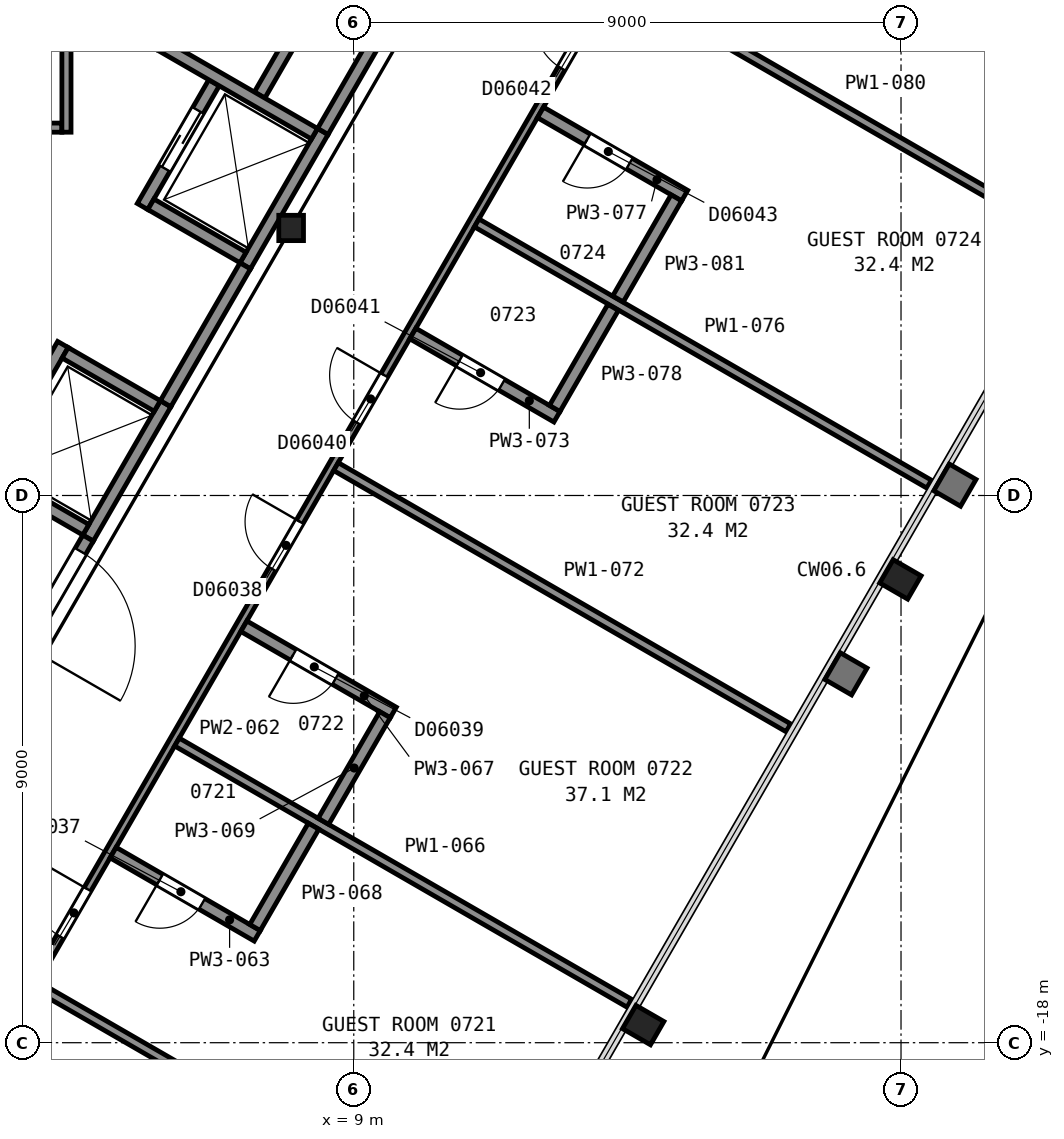
"""IFC4 building model, lengths in metres.
Left out: names, types, materials, properties, quantities, classifications, styles, units other than length and angle.
Written with IfcOpenShell. Run it as: python <this file> out.ifc"""

import sys

from ifc_helpers import new_model, si_unit, direction, frame, frame_2d, origin, origin_2d, place, context, subcontext, project, spatial, rectangle, i_section, extrude, element, fill, save


model = new_model("IFC4")
c1 = context("Model", 3, precision=1e-05, world=origin(), true_north=direction((0.0, 1.0)))
c2 = subcontext(c1, "Body", "Model", "MODEL_VIEW")
j1 = project(units=[si_unit("LENGTHUNIT", "METRE"), si_unit("PLANEANGLEUNIT", "RADIAN")], contexts=[c1])
p1 = place(None, origin())
s1 = spatial("IfcSite", under=j1, at=p1, CompositionType="ELEMENT")
p2 = place(p1, origin())
s2 = spatial("IfcBuilding", under=s1, at=p2, CompositionType="ELEMENT")
p3 = place(p2, frame((0.0, 0.0, 40.4)))
s3 = spatial("IfcBuildingStorey", under=s2, at=p3, CompositionType="ELEMENT", Elevation=40.4)
for number, where, z_axis, x_axis in (
    (1, (13.76, -17.71, 0.0), (0.0, 0.0, 1.0), (-0.5, -0.866, 0.0)),
    (2, (17.99, -10.38, 0.0), (0.0, 0.0, 1.0), (-0.5, -0.866, 0.0)),
):
    element("IfcColumn", number, at=place(p3, frame(where, z_axis=z_axis, x_axis=x_axis)), inside=s3, PredefinedType="COLUMN", context=c2, shape_type="SweptSolid", body=[
        extrude(i_section(OverallWidth=0.442, OverallDepth=0.531, WebThickness=0.066, FlangeThickness=0.106, FilletRadius=0.015, at=origin_2d()), origin(), (0.0, 0.0, 1.0), 3.575),
    ])
p4 = place(p3, frame((7.97, -4.6, 0.0), z_axis=(0.0, 0.0, 1.0), x_axis=(1.0, 0.0, 0.0)))
e3 = element("IfcColumn", 3, at=p4, inside=s3, PredefinedType="COLUMN", context=c2, shape_type="SweptSolid", body=[
    extrude(i_section(OverallWidth=0.406, OverallDepth=0.417, WebThickness=0.03, FlangeThickness=0.048, FilletRadius=0.015, at=origin_2d()), origin(), (0.0, 0.0, 1.0), 3.6),
])
p5 = place(p3, frame((4.63, -9.7, 0.0), z_axis=(0.0, 0.0, 1.0), x_axis=(0.500062241894, 0.865989465428, 0.0)))
e4 = element("IfcWall", 4, at=p5, inside=s3, PredefinedType="PARTITIONING", context=c2, shape_type="SweptSolid", body=[
    extrude(rectangle(XDim=2.55, YDim=0.2, at=frame_2d((1.275, 0.0))), origin(), (0.0, 0.0, 1.0), 3.6),
])
p6 = place(p3, frame((7.216, -5.222, 0.0), z_axis=(0.0, 0.0, 1.0), x_axis=(0.499990435942, 0.866030925526, 0.0)))
e5 = element("IfcWall", 5, at=p6, inside=s3, PredefinedType="PARTITIONING", context=c2, shape_type="SweptSolid", body=[
    extrude(rectangle(XDim=2.55, YDim=0.2, at=frame_2d((1.275, 0.0))), origin(), (0.0, 0.0, 1.0), 3.6),
])
p7 = place(p3, frame((7.451, -2.414, 0.0), z_axis=(0.0, 0.0, 1.0), x_axis=(0.500016218704, 0.866016039709, 0.0)))
e6 = element("IfcWall", 6, at=p7, inside=s3, PredefinedType="PARTITIONING", context=c2, shape_type="SweptSolid", body=[
    extrude(rectangle(XDim=4.7, YDim=0.2, at=frame_2d((2.35, 0.0))), origin(), (0.0, 0.0, 1.0), 3.6),
])
p8 = place(p3, frame((2.942, -8.725, 0.0), z_axis=(0.0, 0.0, 1.0), x_axis=(0.500020783669, 0.866013403995, 0.0)))
e7 = element("IfcWall", 7, at=p8, inside=s3, PredefinedType="PARTITIONING", context=c2, shape_type="SweptSolid", body=[
    extrude(rectangle(XDim=2.55, YDim=0.2, at=frame_2d((1.275, 0.0))), origin(), (0.0, 0.0, 1.0), 3.6),
])
p9 = place(p8, frame((0.725, 0.0, 0.0)))
e8 = element("IfcOpeningElement", 8, at=p9, cuts=e7, PredefinedType="OPENING", context=c2, shape_type="SweptSolid", body=[
    extrude(rectangle(XDim=1.1, YDim=2.1, at=frame_2d((0.55, 1.05))), frame((0.0, 0.11, 0.0), z_axis=(0.0, -1.0, 0.0), x_axis=(1.0, 0.0, 0.0)), (0.0, 0.0, 1.0), 0.22),
])
p10 = place(p3, frame((5.527, -4.247, 0.0), z_axis=(0.0, 0.0, 1.0), x_axis=(0.499938297808, 0.866061024631, 0.0)))
e9 = element("IfcWall", 9, at=p10, inside=s3, PredefinedType="PARTITIONING", context=c2, shape_type="SweptSolid", body=[
    extrude(rectangle(XDim=2.35, YDim=0.2, at=frame_2d((1.175, 0.0))), origin(), (0.0, 0.0, 1.0), 3.6),
])
p11 = place(p10, frame((0.725, 0.0, 0.0)))
e10 = element("IfcOpeningElement", 10, at=p11, cuts=e9, PredefinedType="OPENING", context=c2, shape_type="SweptSolid", body=[
    extrude(rectangle(XDim=1.1, YDim=2.1, at=frame_2d((0.55, 1.05))), frame((0.0, 0.11, 0.0), z_axis=(0.0, -1.0, 0.0), x_axis=(1.0, 0.0, 0.0)), (0.0, 0.0, 1.0), 0.22),
])
p12 = place(p3, frame((8.354, -3.051, 0.0), z_axis=(0.0, 0.0, 1.0), x_axis=(-0.866060182126, 0.499939757307, 0.0)))
e11 = element("IfcWall", 11, at=p12, inside=s3, PredefinedType="PARTITIONING", context=c2, shape_type="SweptSolid", body=[
    extrude(rectangle(XDim=2.95, YDim=0.2, at=frame_2d((1.475, 0.0))), origin(), (0.0, 0.0, 1.0), 3.6),
])
p13 = place(p3, frame((7.179, -5.086, 0.0), z_axis=(0.0, 0.0, 1.0), x_axis=(-0.866036909293, 0.499980071345, 0.0)))
e12 = element("IfcWall", 12, at=p13, inside=s3, PredefinedType="PARTITIONING", context=c2, shape_type="SweptSolid", body=[
    extrude(rectangle(XDim=1.75, YDim=0.2, at=frame_2d((0.875, 0.0))), origin(), (0.0, 0.0, 1.0), 3.6),
])
p14 = place(p3, frame((5.769, -7.528, 0.0), z_axis=(0.0, 0.0, 1.0), x_axis=(-0.866002029911, 0.500040482552, 0.0)))
e13 = element("IfcWall", 13, at=p14, inside=s3, PredefinedType="PARTITIONING", context=c2, shape_type="SweptSolid", body=[
    extrude(rectangle(XDim=1.75, YDim=0.2, at=frame_2d((0.875, 0.0))), origin(), (0.0, 0.0, 1.0), 3.6),
])
p15 = place(p3, frame((4.594, -9.563, 0.0), z_axis=(0.0, 0.0, 1.0), x_axis=(-0.866036909293, 0.499980071345, 0.0)))
e14 = element("IfcWall", 14, at=p15, inside=s3, PredefinedType="PARTITIONING", context=c2, shape_type="SweptSolid", body=[
    extrude(rectangle(XDim=1.75, YDim=0.2, at=frame_2d((0.875, 0.0))), origin(), (0.0, 0.0, 1.0), 3.6),
])
p16 = place(p3, frame((1.677, -14.815, 0.0), z_axis=(0.0, 0.0, 1.0), x_axis=(0.49999445743, 0.866028603765, 0.0)))
e15 = element("IfcWall", 15, at=p16, inside=s3, PredefinedType="PARTITIONING", context=c2, shape_type="SweptSolid", body=[
    extrude(rectangle(XDim=5.905, YDim=0.2, at=frame_2d((2.952, 0.0))), origin(), (0.0, 0.0, 1.0), 3.35),
])
p17 = place(p16, frame((3.855, 0.0, 0.0)))
e16 = element("IfcOpeningElement", 16, at=p17, cuts=e15, PredefinedType="OPENING", context=c2, shape_type="SweptSolid", body=[
    extrude(rectangle(XDim=1.8, YDim=2.1, at=frame_2d((0.9, 1.05))), frame((0.0, 0.11, 0.0), z_axis=(0.0, -1.0, 0.0), x_axis=(1.0, 0.0, 0.0)), (0.0, 0.0, 1.0), 0.22),
])
p18 = place(p3, frame((1.8, -2.95, 0.0), z_axis=(0.0, 0.0, 1.0), x_axis=(1.0, 0.0, 0.0)))
e17 = element("IfcWall", 17, at=p18, inside=s3, PredefinedType="PARTITIONING", context=c2, shape_type="SweptSolid", body=[
    extrude(rectangle(XDim=2.4, YDim=0.15, at=frame_2d((1.2, 0.0))), origin(), (0.0, 0.0, 1.0), 3.35),
])
p19 = place(p3, frame((4.275, -3.025, 0.0), z_axis=(0.0, 0.0, 1.0), x_axis=(0.0, 1.0, 0.0)))
e18 = element("IfcWall", 18, at=p19, inside=s3, PredefinedType="PARTITIONING", context=c2, shape_type="SweptSolid", body=[
    extrude(rectangle(XDim=2.923, YDim=0.15, at=frame_2d((1.461, 0.0))), origin(), (0.0, 0.0, 1.0), 3.35),
])
p20 = place(p3, frame((5.906, -7.49, 0.0), z_axis=(0.0, 0.0, 1.0), x_axis=(0.500252727967, 0.865879442048, 0.0)))
e19 = element("IfcWall", 19, at=p20, inside=s3, PredefinedType="PARTITIONING", context=c2, shape_type="SweptSolid", body=[
    extrude(rectangle(XDim=2.617, YDim=0.2, at=frame_2d((1.309, 0.0))), origin(), (0.0, 0.0, 1.0), 3.35),
])
p21 = place(p3, frame((8.492, -3.012, 0.0), z_axis=(0.0, 0.0, 1.0), x_axis=(0.499972957231, 0.866041016371, 0.0)))
e20 = element("IfcWall", 20, at=p21, inside=s3, PredefinedType="PARTITIONING", context=c2, shape_type="SweptSolid", body=[
    extrude(rectangle(XDim=10.349, YDim=0.2, at=frame_2d((5.174, 0.0))), origin(), (0.0, 0.0, 1.0), 3.35),
])
p22 = place(p3, frame((3.897, -17.132, 0.0), z_axis=(0.0, 0.0, 1.0), x_axis=(0.866084603656, -0.499897448793, 0.0)))
e21 = element("IfcWall", 21, at=p22, inside=s3, PredefinedType="PARTITIONING", context=c2, shape_type="SweptSolid", body=[
    extrude(rectangle(XDim=8.454, YDim=0.15, at=frame_2d((4.227, 0.0))), origin(), (0.0, 0.0, 1.0), 2.613),
])
p23 = place(p3, frame((16.967, 5.906, 0.0), z_axis=(0.0, 0.0, 1.0), x_axis=(-0.500024758804, -0.866011108811, 0.0)))
e22 = element("IfcWall", 22, at=p23, inside=s3, PredefinedType="PARTITIONING", context=c2, shape_type="SweptSolid", body=[
    extrude(rectangle(XDim=26.402, YDim=0.125, at=frame_2d((13.201, 0.0))), origin(), (0.0, 0.0, 1.0), 2.613),
])
p24 = place(p23, frame((24.689, 0.0, 0.0)))
e23 = element("IfcOpeningElement", 23, at=p24, cuts=e22, PredefinedType="OPENING", context=c2, shape_type="SweptSolid", body=[
    extrude(rectangle(XDim=0.9, YDim=2.1, at=frame_2d((0.45, 1.05))), frame((0.0, 0.073, 0.0), z_axis=(0.0, -1.0, 0.0), x_axis=(1.0, 0.0, 0.0)), (0.0, 0.0, 1.0), 0.145),
])
p25 = place(p23, frame((17.709, 0.0, 0.0)))
e24 = element("IfcOpeningElement", 24, at=p25, cuts=e22, PredefinedType="OPENING", context=c2, shape_type="SweptSolid", body=[
    extrude(rectangle(XDim=0.9, YDim=2.1, at=frame_2d((0.45, 1.05))), frame((0.0, 0.073, 0.0), z_axis=(0.0, -1.0, 0.0), x_axis=(1.0, 0.0, 0.0)), (0.0, 0.0, 1.0), 0.145),
])
p26 = place(p23, frame((14.928, 0.0, 0.0)))
e25 = element("IfcOpeningElement", 25, at=p26, cuts=e22, PredefinedType="OPENING", context=c2, shape_type="SweptSolid", body=[
    extrude(rectangle(XDim=0.9, YDim=2.1, at=frame_2d((0.45, 1.05))), frame((0.0, 0.073, 0.0), z_axis=(0.0, -1.0, 0.0), x_axis=(1.0, 0.0, 0.0)), (0.0, 0.0, 1.0), 0.145),
])
p27 = place(p23, frame((8.2, 0.0, 0.0)))
e26 = element("IfcOpeningElement", 26, at=p27, cuts=e22, PredefinedType="OPENING", context=c2, shape_type="SweptSolid", body=[
    extrude(rectangle(XDim=0.9, YDim=2.1, at=frame_2d((0.45, 1.05))), frame((0.0, 0.073, 0.0), z_axis=(0.0, -1.0, 0.0), x_axis=(1.0, 0.0, 0.0)), (0.0, 0.0, 1.0), 0.145),
])
p28 = place(p23, frame((5.473, 0.0, 0.0)))
e27 = element("IfcOpeningElement", 27, at=p28, cuts=e22, PredefinedType="OPENING", context=c2, shape_type="SweptSolid", body=[
    extrude(rectangle(XDim=1.0, YDim=2.1, at=frame_2d((0.5, 1.05))), frame((0.0, 0.073, 0.0), z_axis=(0.0, -1.0, 0.0), x_axis=(1.0, 0.0, 0.0)), (0.0, 0.0, 1.0), 0.145),
])
p29 = place(p3, frame((5.042, -14.873, 0.0), z_axis=(0.0, 0.0, 1.0), x_axis=(0.866005850709, -0.50003386539, 0.0)))
e28 = element("IfcWall", 28, at=p29, inside=s3, PredefinedType="PARTITIONING", context=c2, shape_type="SweptSolid", body=[
    extrude(rectangle(XDim=2.737, YDim=0.2, at=frame_2d((1.369, 0.0))), origin(), (0.0, 0.0, 1.0), 2.613),
])
p30 = place(p29, frame((0.887, 0.0, 0.0)))
e29 = element("IfcOpeningElement", 29, at=p30, cuts=e28, PredefinedType="OPENING", context=c2, shape_type="SweptSolid", body=[
    extrude(rectangle(XDim=0.8, YDim=2.1, at=frame_2d((0.4, 1.05))), frame((0.0, 0.11, 0.0), z_axis=(0.0, -1.0, 0.0), x_axis=(1.0, 0.0, 0.0)), (0.0, 0.0, 1.0), 0.22),
])
p31 = place(p3, frame((6.092, -13.055, 0.0), z_axis=(0.0, 0.0, 1.0), x_axis=(0.866002910178, -0.500038958046, 0.0)))
e30 = element("IfcWall", 30, at=p31, inside=s3, PredefinedType="PARTITIONING", context=c2, shape_type="SweptSolid", body=[
    extrude(rectangle(XDim=8.591, YDim=0.15, at=frame_2d((4.295, 0.0))), origin(), (0.0, 0.0, 1.0), 2.613),
])
p32 = place(p3, frame((9.65, -12.569, 0.0), z_axis=(0.0, 0.0, 1.0), x_axis=(-0.866010792954, 0.500025305846, 0.0)))
e31 = element("IfcWall", 31, at=p32, inside=s3, PredefinedType="PARTITIONING", context=c2, shape_type="SweptSolid", body=[
    extrude(rectangle(XDim=2.838, YDim=0.2, at=frame_2d((1.419, 0.0))), origin(), (0.0, 0.0, 1.0), 2.613),
])
p33 = place(p32, frame((1.1, 0.0, 0.0)))
e32 = element("IfcOpeningElement", 32, at=p33, cuts=e31, PredefinedType="OPENING", context=c2, shape_type="SweptSolid", body=[
    extrude(rectangle(XDim=0.8, YDim=2.1, at=frame_2d((0.4, 1.05))), frame((0.0, 0.11, 0.0), z_axis=(0.0, -1.0, 0.0), x_axis=(1.0, 0.0, 0.0)), (0.0, 0.0, 1.0), 0.22),
])
p34 = place(p3, frame((7.376, -16.105, 0.0), z_axis=(0.0, 0.0, 1.0), x_axis=(0.500095816526, 0.865970077019, 0.0)))
e33 = element("IfcWall", 33, at=p34, inside=s3, PredefinedType="PARTITIONING", context=c2, shape_type="SweptSolid", body=[
    extrude(rectangle(XDim=1.924, YDim=0.2, at=frame_2d((0.962, 0.0))), origin(), (0.0, 0.0, 1.0), 2.613),
])
p35 = place(p3, frame((8.5, -14.359, 0.0), z_axis=(0.0, 0.0, 1.0), x_axis=(0.500042536776, 0.866000843773, 0.0)))
e34 = element("IfcWall", 34, at=p35, inside=s3, PredefinedType="PARTITIONING", context=c2, shape_type="SweptSolid", body=[
    extrude(rectangle(XDim=2.025, YDim=0.2, at=frame_2d((1.012, 0.0))), origin(), (0.0, 0.0, 1.0), 2.613),
])
p36 = place(p3, frame((8.707, -8.525, 0.0), z_axis=(0.0, 0.0, 1.0), x_axis=(0.866036528751, -0.499980730498, 0.0)))
e35 = element("IfcWall", 35, at=p36, inside=s3, PredefinedType="PARTITIONING", context=c2, shape_type="SweptSolid", body=[
    extrude(rectangle(XDim=8.592, YDim=0.15, at=frame_2d((4.296, 0.0))), origin(), (0.0, 0.0, 1.0), 2.613),
])
p37 = place(p3, frame((9.971, -6.336, 0.0), z_axis=(0.0, 0.0, 1.0), x_axis=(0.86596722502, -0.50010075504, 0.0)))
e36 = element("IfcWall", 36, at=p37, inside=s3, PredefinedType="PARTITIONING", context=c2, shape_type="SweptSolid", body=[
    extrude(rectangle(XDim=2.737, YDim=0.2, at=frame_2d((1.369, 0.0))), origin(), (0.0, 0.0, 1.0), 2.613),
])
p38 = place(p37, frame((0.887, 0.0, 0.0)))
e37 = element("IfcOpeningElement", 37, at=p38, cuts=e36, PredefinedType="OPENING", context=c2, shape_type="SweptSolid", body=[
    extrude(rectangle(XDim=0.8, YDim=2.1, at=frame_2d((0.4, 1.05))), frame((0.0, 0.11, 0.0), z_axis=(0.0, -1.0, 0.0), x_axis=(1.0, 0.0, 0.0)), (0.0, 0.0, 1.0), 0.22),
])
p39 = place(p3, frame((11.021, -4.517, 0.0), z_axis=(0.0, 0.0, 1.0), x_axis=(0.866029425019, -0.499993034952, 0.0)))
e38 = element("IfcWall", 38, at=p39, inside=s3, PredefinedType="PARTITIONING", context=c2, shape_type="SweptSolid", body=[
    extrude(rectangle(XDim=8.591, YDim=0.15, at=frame_2d((4.296, 0.0))), origin(), (0.0, 0.0, 1.0), 2.613),
])
p40 = place(p3, frame((14.442, -4.068, 0.0), z_axis=(0.0, 0.0, 1.0), x_axis=(-0.865989529477, 0.500062130976, 0.0)))
e39 = element("IfcWall", 39, at=p40, inside=s3, PredefinedType="PARTITIONING", context=c2, shape_type="SweptSolid", body=[
    extrude(rectangle(XDim=2.738, YDim=0.2, at=frame_2d((1.369, 0.0))), origin(), (0.0, 0.0, 1.0), 2.613),
])
p41 = place(p40, frame((1.05, 0.0, 0.0)))
e40 = element("IfcOpeningElement", 40, at=p41, cuts=e39, PredefinedType="OPENING", context=c2, shape_type="SweptSolid", body=[
    extrude(rectangle(XDim=0.8, YDim=2.1, at=frame_2d((0.4, 1.05))), frame((0.0, 0.11, 0.0), z_axis=(0.0, -1.0, 0.0), x_axis=(1.0, 0.0, 0.0)), (0.0, 0.0, 1.0), 0.22),
])
p42 = place(p3, frame((12.305, -7.568, 0.0), z_axis=(0.0, 0.0, 1.0), x_axis=(0.500269123289, 0.865869969617, 0.0)))
e41 = element("IfcWall", 41, at=p42, inside=s3, PredefinedType="PARTITIONING", context=c2, shape_type="SweptSolid", body=[
    extrude(rectangle(XDim=1.92, YDim=0.2, at=frame_2d((0.96, 0.0))), origin(), (0.0, 0.0, 1.0), 2.613),
])
p43 = place(p3, frame((13.335, -0.51, 0.0), z_axis=(0.0, 0.0, 1.0), x_axis=(0.865995804368, -0.50005126419, 0.0)))
e42 = element("IfcWall", 42, at=p43, inside=s3, PredefinedType="PARTITIONING", context=c2, shape_type="SweptSolid", body=[
    extrude(rectangle(XDim=8.591, YDim=0.15, at=frame_2d((4.295, 0.0))), origin(), (0.0, 0.0, 1.0), 2.613),
])
p44 = place(p3, frame((13.345, -5.767, 0.0), z_axis=(0.0, 0.0, 1.0), x_axis=(0.499832553123, 0.866122057702, 0.0)))
e43 = element("IfcWall", 43, at=p44, inside=s3, PredefinedType="PARTITIONING", context=c2, shape_type="SweptSolid", body=[
    extrude(rectangle(XDim=1.92, YDim=0.2, at=frame_2d((0.96, 0.0))), origin(), (0.0, 0.0, 1.0), 2.613),
])
p45 = place(p11, origin())
e44 = element("IfcDoor", 44, at=p45, inside=s3, OperationType="SLIDING_TO_LEFT", PredefinedType="DOOR", context=c2, shape_type="SweptSolid", body=[
    extrude(rectangle(XDim=1.1, YDim=2.1, at=frame_2d((0.55, 1.05))), frame((0.0, 0.025, 0.0), z_axis=(0.0, -1.0, 0.0), x_axis=(1.0, 0.0, 0.0)), (0.0, 0.0, 1.0), 0.05),
])
fill(e10, e44)
p46 = place(p17, origin())
e45 = element("IfcDoor", 45, at=p46, inside=s3, OperationType="DOUBLE_DOOR_SINGLE_SWING", PredefinedType="DOOR", context=c2, shape_type="SweptSolid", body=[
    extrude(rectangle(XDim=1.8, YDim=2.1, at=frame_2d((0.9, 1.05))), frame((0.0, 0.025, 0.0), z_axis=(0.0, -1.0, 0.0), x_axis=(1.0, 0.0, 0.0)), (0.0, 0.0, 1.0), 0.05),
])
fill(e16, e45)
p47 = place(p24, origin())
e46 = element("IfcDoor", 46, at=p47, inside=s3, OperationType="SINGLE_SWING_LEFT", PredefinedType="DOOR", context=c2, shape_type="SweptSolid", body=[
    extrude(rectangle(XDim=0.9, YDim=2.1, at=frame_2d((0.45, 1.05))), frame((0.0, 0.025, 0.0), z_axis=(0.0, -1.0, 0.0), x_axis=(1.0, 0.0, 0.0)), (0.0, 0.0, 1.0), 0.05),
])
fill(e23, e46)
p48 = place(p25, origin())
e47 = element("IfcDoor", 47, at=p48, inside=s3, OperationType="SINGLE_SWING_LEFT", PredefinedType="DOOR", context=c2, shape_type="SweptSolid", body=[
    extrude(rectangle(XDim=0.9, YDim=2.1, at=frame_2d((0.45, 1.05))), frame((0.0, 0.025, 0.0), z_axis=(0.0, -1.0, 0.0), x_axis=(1.0, 0.0, 0.0)), (0.0, 0.0, 1.0), 0.05),
])
fill(e24, e47)
p49 = place(p26, origin())
e48 = element("IfcDoor", 48, at=p49, inside=s3, OperationType="SINGLE_SWING_LEFT", PredefinedType="DOOR", context=c2, shape_type="SweptSolid", body=[
    extrude(rectangle(XDim=0.9, YDim=2.1, at=frame_2d((0.45, 1.05))), frame((0.0, 0.025, 0.0), z_axis=(0.0, -1.0, 0.0), x_axis=(1.0, 0.0, 0.0)), (0.0, 0.0, 1.0), 0.05),
])
fill(e25, e48)
p50 = place(p27, origin())
e49 = element("IfcDoor", 49, at=p50, inside=s3, OperationType="SINGLE_SWING_LEFT", PredefinedType="DOOR", context=c2, shape_type="SweptSolid", body=[
    extrude(rectangle(XDim=0.9, YDim=2.1, at=frame_2d((0.45, 1.05))), frame((0.0, 0.025, 0.0), z_axis=(0.0, -1.0, 0.0), x_axis=(1.0, 0.0, 0.0)), (0.0, 0.0, 1.0), 0.05),
])
fill(e26, e49)
p51 = place(p30, origin())
e50 = element("IfcDoor", 50, at=p51, inside=s3, OperationType="SINGLE_SWING_LEFT", PredefinedType="DOOR", context=c2, shape_type="SweptSolid", body=[
    extrude(rectangle(XDim=0.8, YDim=2.1, at=frame_2d((0.4, 1.05))), frame((0.0, 0.025, 0.0), z_axis=(0.0, -1.0, 0.0), x_axis=(1.0, 0.0, 0.0)), (0.0, 0.0, 1.0), 0.05),
])
fill(e29, e50)
p52 = place(p33, origin())
e51 = element("IfcDoor", 51, at=p52, inside=s3, OperationType="SINGLE_SWING_RIGHT", PredefinedType="DOOR", context=c2, shape_type="SweptSolid", body=[
    extrude(rectangle(XDim=0.8, YDim=2.1, at=frame_2d((0.4, 1.05))), frame((0.0, 0.025, 0.0), z_axis=(0.0, -1.0, 0.0), x_axis=(1.0, 0.0, 0.0)), (0.0, 0.0, 1.0), 0.05),
])
fill(e32, e51)
p53 = place(p38, origin())
e52 = element("IfcDoor", 52, at=p53, inside=s3, OperationType="SINGLE_SWING_LEFT", PredefinedType="DOOR", context=c2, shape_type="SweptSolid", body=[
    extrude(rectangle(XDim=0.8, YDim=2.1, at=frame_2d((0.4, 1.05))), frame((0.0, 0.025, 0.0), z_axis=(0.0, -1.0, 0.0), x_axis=(1.0, 0.0, 0.0)), (0.0, 0.0, 1.0), 0.05),
])
fill(e37, e52)
p54 = place(p41, origin())
e53 = element("IfcDoor", 53, at=p54, inside=s3, OperationType="SINGLE_SWING_RIGHT", PredefinedType="DOOR", context=c2, shape_type="SweptSolid", body=[
    extrude(rectangle(XDim=0.8, YDim=2.1, at=frame_2d((0.4, 1.05))), frame((0.0, 0.025, 0.0), z_axis=(0.0, -1.0, 0.0), x_axis=(1.0, 0.0, 0.0)), (0.0, 0.0, 1.0), 0.05),
])
fill(e40, e53)
save(model, sys.argv[1])
